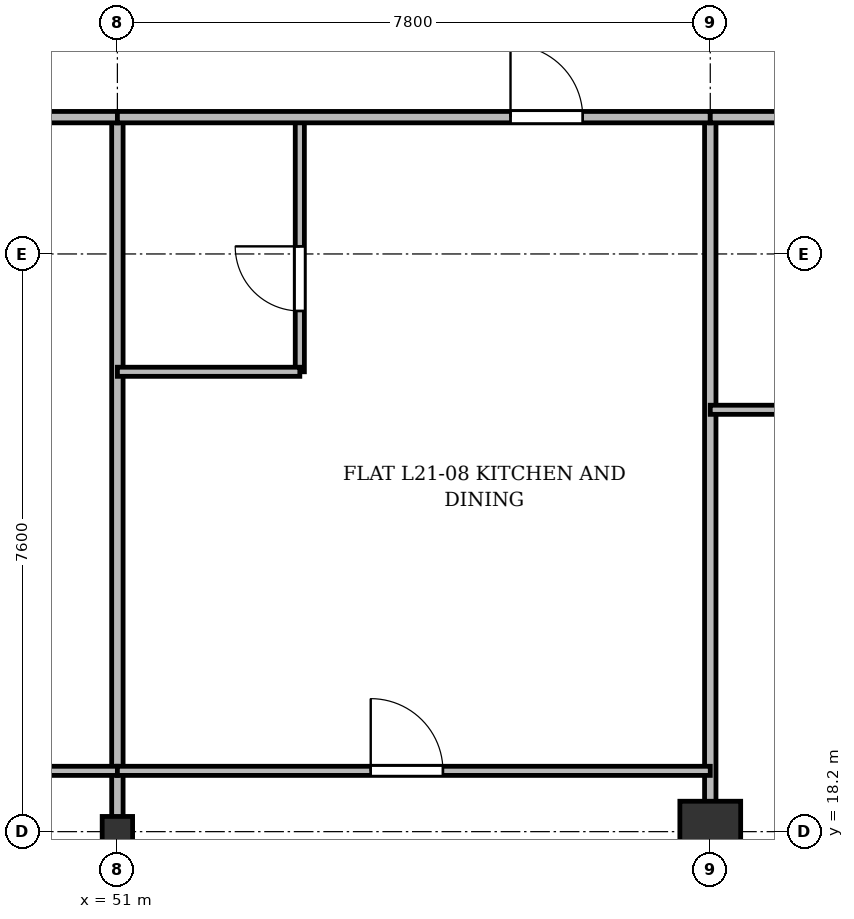
"""IFC4 building model, lengths in metres.
Left out: names, types, materials, properties, quantities, classifications, styles, units other than length and angle.
Written with IfcOpenShell. Run it as: python <this file> out.ifc"""

import sys

from ifc_helpers import new_model, si_unit, direction, frame, frame_2d, origin, origin_2d, place, context, subcontext, project, spatial, rectangle, i_section, extrude, source, transform, mapped, element, fill, save


model = new_model("IFC4")
c1 = context("Model", 3, precision=1e-05, world=origin(), true_north=direction((0.0, 1.0)))
c2 = subcontext(c1, "Body", "Model", "MODEL_VIEW")
j1 = project(units=[si_unit("LENGTHUNIT", "METRE"), si_unit("PLANEANGLEUNIT", "RADIAN")], contexts=[c1])
p1 = place(None, origin())
s1 = spatial("IfcSite", under=j1, at=p1, CompositionType="ELEMENT")
p2 = place(p1, origin())
s2 = spatial("IfcBuilding", under=s1, at=p2, CompositionType="ELEMENT")
p3 = place(p2, frame((0.0, 0.0, 85.3)))
s3 = spatial("IfcBuildingStorey", under=s2, at=p3, CompositionType="ELEMENT", Elevation=85.3)
m1 = source(origin(), c2, "Body", "SweptSolid", [
    extrude(i_section(OverallWidth=0.4, OverallDepth=0.4, WebThickness=0.022, FlangeThickness=0.035, at=origin_2d()), origin(), (0.0, 0.0, 1.0), 3.6),
])
p4 = place(p3, frame((51.0, 18.2, 0.0), z_axis=(0.0, 0.0, 1.0), x_axis=(1.0, 0.0, 0.0)))
e1 = element("IfcColumn", 1, at=p4, inside=s3, PredefinedType="COLUMN", context=c2, shape_type="MappedRepresentation", body=[
    mapped(m1, transform((0.0, 0.0, 0.0), x_axis=(1.0, 0.0, 0.0), y_axis=(0.0, 1.0, 0.0), z_axis=(0.0, 0.0, 1.0), scale=1.0)),
])
m2 = source(origin(), c2, "Body", "SweptSolid", [
    extrude(rectangle(XDim=0.8, YDim=0.8, at=origin_2d()), origin(), (0.0, 0.0, 1.0), 3.6),
])
p5 = place(p3, frame((58.8, 18.2, 0.0), z_axis=(0.0, 0.0, 1.0), x_axis=(1.0, 0.0, 0.0)))
e2 = element("IfcColumn", 2, at=p5, inside=s3, PredefinedType="COLUMN", context=c2, shape_type="MappedRepresentation", body=[
    mapped(m2, transform((0.0, 0.0, 0.0), x_axis=(1.0, 0.0, 0.0), y_axis=(0.0, 1.0, 0.0), z_axis=(0.0, 0.0, 1.0), scale=1.0)),
])
for number, where, z_axis, x_axis in (
    (3, (51.0, 3.145, 0.0), (0.0, 0.0, 1.0), (0.0, 1.0, 0.0)),
    (4, (58.8, 3.145, 0.0), (0.0, 0.0, 1.0), (0.0, 1.0, 0.0)),
):
    element("IfcWall", number, at=place(p3, frame(where, z_axis=z_axis, x_axis=x_axis)), inside=s3, PredefinedType="PARTITIONING", context=c2, shape_type="SweptSolid", body=[
        extrude(rectangle(XDim=24.455, YDim=0.15, at=frame_2d((12.228, 0.0))), origin(), (0.0, 0.0, 1.0), 2.84),
    ])
p6 = place(p3, frame((43.8, 19.0, 0.0), z_axis=(0.0, 0.0, 1.0), x_axis=(1.0, 0.0, 0.0)))
e5 = element("IfcWall", 5, at=p6, inside=s3, PredefinedType="PARTITIONING", context=c2, shape_type="SweptSolid", body=[
    extrude(rectangle(XDim=7.2, YDim=0.12, at=frame_2d((3.6, 0.0))), origin(), (0.0, 0.0, 1.0), 2.84),
])
p7 = place(p6, frame((3.125, 0.0, 0.0)))
e6 = element("IfcOpeningElement", 6, at=p7, cuts=e5, PredefinedType="OPENING", context=c2, shape_type="SweptSolid", body=[
    extrude(rectangle(XDim=0.95, YDim=2.15, at=frame_2d((0.475, 1.075))), frame((0.0, 0.07, 0.0), z_axis=(0.0, -1.0, 0.0), x_axis=(1.0, 0.0, 0.0)), (0.0, 0.0, 1.0), 0.14),
])
p8 = place(p3, frame((43.8, 27.6, 0.0), z_axis=(0.0, 0.0, 1.0), x_axis=(1.0, 0.0, 0.0)))
e7 = element("IfcWall", 7, at=p8, inside=s3, PredefinedType="PARTITIONING", context=c2, shape_type="SweptSolid", body=[
    extrude(rectangle(XDim=7.2, YDim=0.15, at=frame_2d((3.6, 0.0))), origin(), (0.0, 0.0, 1.0), 2.84),
])
p9 = place(p8, frame((4.706, 0.0, 0.0)))
e8 = element("IfcOpeningElement", 8, at=p9, cuts=e7, PredefinedType="OPENING", context=c2, shape_type="SweptSolid", body=[
    extrude(rectangle(XDim=0.95, YDim=2.15, at=frame_2d((0.475, 1.075))), frame((0.0, 0.085, 0.0), z_axis=(0.0, -1.0, 0.0), x_axis=(1.0, 0.0, 0.0)), (0.0, 0.0, 1.0), 0.17),
])
p10 = place(p3, frame((51.0, 19.0, 0.0), z_axis=(0.0, 0.0, 1.0), x_axis=(1.0, 0.0, 0.0)))
e9 = element("IfcWall", 9, at=p10, inside=s3, PredefinedType="PARTITIONING", context=c2, shape_type="SweptSolid", body=[
    extrude(rectangle(XDim=7.8, YDim=0.12, at=frame_2d((3.9, 0.0))), origin(), (0.0, 0.0, 1.0), 2.84),
])
p11 = place(p10, frame((3.333, 0.0, 0.0)))
e10 = element("IfcOpeningElement", 10, at=p11, cuts=e9, PredefinedType="OPENING", context=c2, shape_type="SweptSolid", body=[
    extrude(rectangle(XDim=0.95, YDim=2.15, at=frame_2d((0.475, 1.075))), frame((0.0, 0.07, 0.0), z_axis=(0.0, -1.0, 0.0), x_axis=(1.0, 0.0, 0.0)), (0.0, 0.0, 1.0), 0.14),
])
p12 = place(p3, frame((53.4, 24.25, 0.0), z_axis=(0.0, 0.0, 1.0), x_axis=(0.0, 1.0, 0.0)))
e11 = element("IfcWall", 11, at=p12, inside=s3, PredefinedType="PARTITIONING", context=c2, shape_type="SweptSolid", body=[
    extrude(rectangle(XDim=3.35, YDim=0.12, at=frame_2d((1.675, 0.0))), origin(), (0.0, 0.0, 1.0), 2.99),
])
p13 = place(p12, frame((0.8, 0.0, 0.0)))
e12 = element("IfcOpeningElement", 12, at=p13, cuts=e11, PredefinedType="OPENING", context=c2, shape_type="SweptSolid", body=[
    extrude(rectangle(XDim=0.85, YDim=2.1, at=frame_2d((0.425, 1.05))), frame((0.0, 0.07, 0.0), z_axis=(0.0, -1.0, 0.0), x_axis=(1.0, 0.0, 0.0)), (0.0, 0.0, 1.0), 0.14),
])
p14 = place(p3, frame((51.0, 24.25, 0.0), z_axis=(0.0, 0.0, 1.0), x_axis=(1.0, 0.0, 0.0)))
e13 = element("IfcWall", 13, at=p14, inside=s3, PredefinedType="PARTITIONING", context=c2, shape_type="SweptSolid", body=[
    extrude(rectangle(XDim=2.4, YDim=0.12, at=frame_2d((1.2, 0.0))), origin(), (0.0, 0.0, 1.0), 2.84),
])
p15 = place(p3, frame((51.0, 27.6, 0.0), z_axis=(0.0, 0.0, 1.0), x_axis=(1.0, 0.0, 0.0)))
e14 = element("IfcWall", 14, at=p15, inside=s3, PredefinedType="PARTITIONING", context=c2, shape_type="SweptSolid", body=[
    extrude(rectangle(XDim=7.8, YDim=0.15, at=frame_2d((3.9, 0.0))), origin(), (0.0, 0.0, 1.0), 2.84),
])
p16 = place(p15, frame((5.172, 0.0, 0.0)))
e15 = element("IfcOpeningElement", 15, at=p16, cuts=e14, PredefinedType="OPENING", context=c2, shape_type="SweptSolid", body=[
    extrude(rectangle(XDim=0.95, YDim=2.15, at=frame_2d((0.475, 1.075))), frame((0.0, 0.085, 0.0), z_axis=(0.0, -1.0, 0.0), x_axis=(1.0, 0.0, 0.0)), (0.0, 0.0, 1.0), 0.17),
])
p17 = place(p3, frame((58.8, 27.6, 0.0), z_axis=(0.0, 0.0, 1.0), x_axis=(1.0, 0.0, 0.0)))
e16 = element("IfcWall", 16, at=p17, inside=s3, PredefinedType="PARTITIONING", context=c2, shape_type="SweptSolid", body=[
    extrude(rectangle(XDim=4.8, YDim=0.15, at=frame_2d((2.4, 0.0))), origin(), (0.0, 0.0, 1.0), 2.84),
])
p18 = place(p17, frame((1.834, 0.0, 0.0)))
e17 = element("IfcOpeningElement", 17, at=p18, cuts=e16, PredefinedType="OPENING", context=c2, shape_type="SweptSolid", body=[
    extrude(rectangle(XDim=0.95, YDim=2.15, at=frame_2d((0.475, 1.075))), frame((0.0, 0.085, 0.0), z_axis=(0.0, -1.0, 0.0), x_axis=(1.0, 0.0, 0.0)), (0.0, 0.0, 1.0), 0.17),
])
p19 = place(p3, frame((58.8, 23.75, 0.0), z_axis=(0.0, 0.0, 1.0), x_axis=(1.0, 0.0, 0.0)))
e18 = element("IfcWall", 18, at=p19, inside=s3, PredefinedType="PARTITIONING", context=c2, shape_type="SweptSolid", body=[
    extrude(rectangle(XDim=4.8, YDim=0.12, at=frame_2d((2.4, 0.0))), origin(), (0.0, 0.0, 1.0), 2.84),
])
p20 = place(p19, frame((1.834, 0.0, 0.0)))
e19 = element("IfcOpeningElement", 19, at=p20, cuts=e18, PredefinedType="OPENING", context=c2, shape_type="SweptSolid", body=[
    extrude(rectangle(XDim=0.95, YDim=2.15, at=frame_2d((0.475, 1.075))), frame((0.0, 0.07, 0.0), z_axis=(0.0, -1.0, 0.0), x_axis=(1.0, 0.0, 0.0)), (0.0, 0.0, 1.0), 0.14),
])
m3 = source(origin(), c2, "Body", "SweptSolid", [
    extrude(rectangle(XDim=0.95, YDim=2.15, at=frame_2d((0.475, 1.075))), frame((0.0, 0.025, 0.0), z_axis=(0.0, -1.0, 0.0), x_axis=(1.0, 0.0, 0.0)), (0.0, 0.0, 1.0), 0.05),
])
p21 = place(p11, origin())
e20 = element("IfcDoor", 20, at=p21, inside=s3, OperationType="SINGLE_SWING_LEFT", PredefinedType="DOOR", context=c2, shape_type="MappedRepresentation", body=[
    mapped(m3, transform((0.0, 0.0, 0.0), x_axis=(1.0, 0.0, 0.0), y_axis=(0.0, 1.0, 0.0), z_axis=(0.0, 0.0, 1.0), scale=1.0)),
])
fill(e10, e20)
m4 = source(origin(), c2, "Body", "SweptSolid", [
    extrude(rectangle(XDim=0.85, YDim=2.1, at=frame_2d((0.425, 1.05))), frame((0.0, 0.025, 0.0), z_axis=(0.0, -1.0, 0.0), x_axis=(1.0, 0.0, 0.0)), (0.0, 0.0, 1.0), 0.05),
])
p22 = place(p13, origin())
e21 = element("IfcDoor", 21, at=p22, inside=s3, OperationType="SINGLE_SWING_RIGHT", PredefinedType="DOOR", context=c2, shape_type="MappedRepresentation", body=[
    mapped(m4, transform((0.0, 0.0, 0.0), x_axis=(1.0, 0.0, 0.0), y_axis=(0.0, 1.0, 0.0), z_axis=(0.0, 0.0, 1.0), scale=1.0)),
])
fill(e12, e21)
p23 = place(p16, origin())
e22 = element("IfcDoor", 22, at=p23, inside=s3, OperationType="SINGLE_SWING_LEFT", PredefinedType="DOOR", context=c2, shape_type="MappedRepresentation", body=[
    mapped(m3, transform((0.0, 0.0, 0.0), x_axis=(1.0, 0.0, 0.0), y_axis=(0.0, 1.0, 0.0), z_axis=(0.0, 0.0, 1.0), scale=1.0)),
])
fill(e15, e22)
save(model, sys.argv[1])
